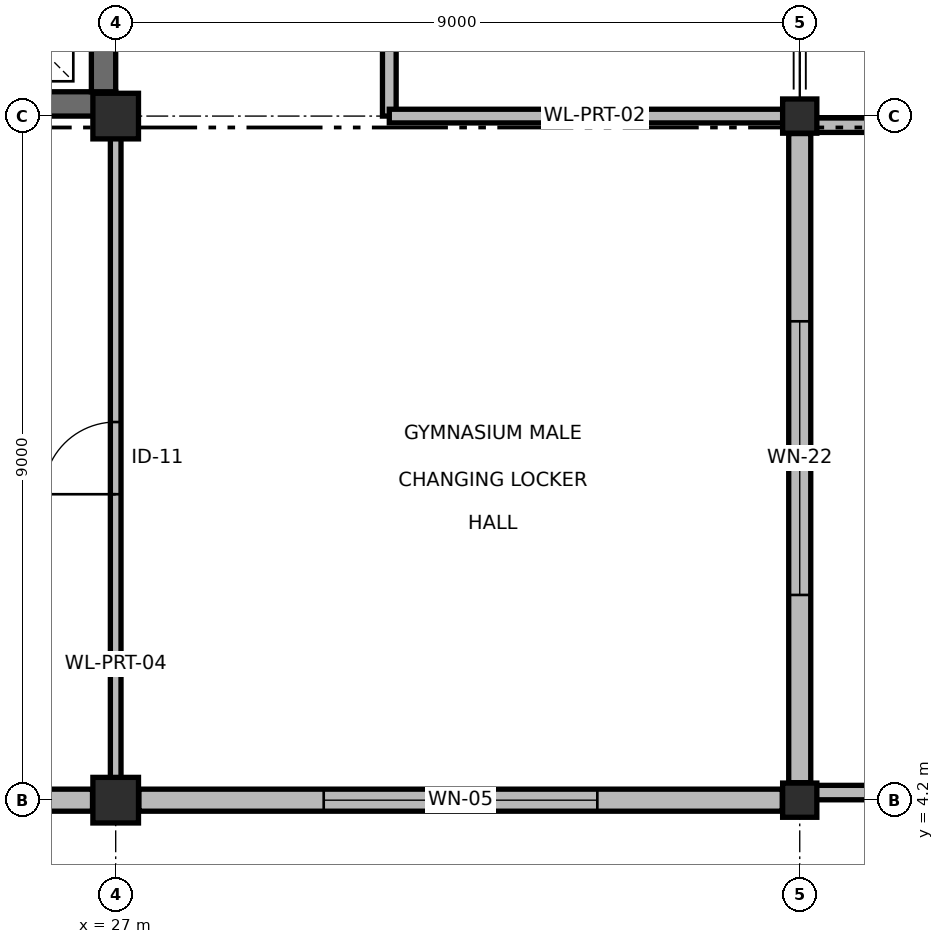
"""IFC4 building model, lengths in metres.
Left out: names, types, materials, properties, quantities, classifications, styles, units other than length and angle.
Written with IfcOpenShell. Run it as: python <this file> out.ifc"""

import sys

from ifc_helpers import new_model, si_unit, direction, frame, frame_2d, origin, origin_2d, place, context, subcontext, project, spatial, rectangle, extrude, element, fill, save


model = new_model("IFC4")
c1 = context("Model", 3, precision=1e-05, world=origin(), true_north=direction((0.0, 1.0)))
c2 = subcontext(c1, "Body", "Model", "MODEL_VIEW")
j1 = project(units=[si_unit("LENGTHUNIT", "METRE"), si_unit("PLANEANGLEUNIT", "RADIAN")], contexts=[c1])
p1 = place(None, origin())
s1 = spatial("IfcSite", under=j1, at=p1, CompositionType="ELEMENT")
p2 = place(p1, origin())
s2 = spatial("IfcBuilding", under=s1, at=p2, CompositionType="ELEMENT")
p3 = place(p2, frame((0.0, 0.0, 9.6)))
s3 = spatial("IfcBuildingStorey", under=s2, at=p3, CompositionType="ELEMENT", Elevation=9.6)
for number, where, z_axis, x_axis in (
    (1, (27.0, 4.2, 0.0), (0.0, 0.0, 1.0), (1.0, 0.0, 0.0)),
    (2, (27.0, 13.2, 0.0), (0.0, 0.0, 1.0), (1.0, 0.0, 0.0)),
):
    element("IfcColumn", number, at=place(p3, frame(where, z_axis=z_axis, x_axis=x_axis)), inside=s3, PredefinedType="COLUMN", context=c2, shape_type="SweptSolid", body=[
        extrude(rectangle(XDim=0.6, YDim=0.6, at=origin_2d()), origin(), (0.0, 0.0, 1.0), 4.5),
    ])
for number, where, z_axis, x_axis in (
    (3, (36.0, 4.2, 0.0), (0.0, 0.0, 1.0), (1.0, 0.0, 0.0)),
    (4, (36.0, 13.2, 0.0), (0.0, 0.0, 1.0), (1.0, 0.0, 0.0)),
):
    element("IfcColumn", number, at=place(p3, frame(where, z_axis=z_axis, x_axis=x_axis)), inside=s3, PredefinedType="COLUMN", context=c2, shape_type="SweptSolid", body=[
        extrude(rectangle(XDim=0.45, YDim=0.45, at=origin_2d()), origin(), (0.0, 0.0, 1.0), 4.5),
    ])
p4 = place(p3, frame((9.0, 13.36, 0.0), z_axis=(0.0, 0.0, 1.0), x_axis=(1.0, 0.0, 0.0)))
e5 = element("IfcWall", 5, at=p4, inside=s3, PredefinedType="SHEAR", context=c2, shape_type="SweptSolid", body=[
    extrude(rectangle(XDim=18.0, YDim=0.32, at=frame_2d((9.0, 0.0))), origin(), (0.0, 0.0, 1.0), 4.5),
])
p5 = place(p3, frame((26.84, 13.52, 0.0), z_axis=(0.0, 0.0, 1.0), x_axis=(0.0, 1.0, 0.0)))
e6 = element("IfcWall", 6, at=p5, inside=s3, PredefinedType="SHEAR", context=c2, shape_type="SweptSolid", body=[
    extrude(rectangle(XDim=8.48, YDim=0.32, at=frame_2d((4.24, 0.0))), origin(), (0.0, 0.0, 1.0), 4.5),
])
p6 = place(p3, frame((26.695, 4.2, 0.0), z_axis=(0.0, 0.0, 1.0), x_axis=(-1.0, 0.0, 0.0)))
e7 = element("IfcWall", 7, at=p6, inside=s3, PredefinedType="SOLIDWALL", context=c2, shape_type="SweptSolid", body=[
    extrude(rectangle(XDim=8.39, YDim=0.29, at=frame_2d((4.195, 0.0))), origin(), (0.0, 0.0, 1.0), 3.525),
])
p7 = place(p6, frame((3.295, 0.0, 0.95)))
e8 = element("IfcOpeningElement", 8, at=p7, cuts=e7, PredefinedType="OPENING", context=c2, shape_type="SweptSolid", body=[
    extrude(rectangle(XDim=1.8, YDim=0.9, at=frame_2d((0.9, 0.45))), frame((0.0, 0.155, 0.0), z_axis=(0.0, -1.0, 0.0), x_axis=(1.0, 0.0, 0.0)), (0.0, 0.0, 1.0), 0.31),
])
p8 = place(p3, frame((35.77, 4.2, 0.0), z_axis=(0.0, 0.0, 1.0), x_axis=(-1.0, 0.0, 0.0)))
e9 = element("IfcWall", 9, at=p8, inside=s3, PredefinedType="SOLIDWALL", context=c2, shape_type="SweptSolid", body=[
    extrude(rectangle(XDim=8.465, YDim=0.29, at=frame_2d((4.232, 0.0))), origin(), (0.0, 0.0, 1.0), 3.525),
])
p9 = place(p8, frame((2.433, 0.0, 0.95)))
e10 = element("IfcOpeningElement", 10, at=p9, cuts=e9, PredefinedType="OPENING", context=c2, shape_type="SweptSolid", body=[
    extrude(rectangle(XDim=3.6, YDim=1.2, at=frame_2d((1.8, 0.6))), frame((0.0, 0.155, 0.0), z_axis=(0.0, -1.0, 0.0), x_axis=(1.0, 0.0, 0.0)), (0.0, 0.0, 1.0), 0.31),
])
p10 = place(p3, frame((36.0, 12.97, 0.0), z_axis=(0.0, 0.0, 1.0), x_axis=(0.0, -1.0, 0.0)))
e11 = element("IfcWall", 11, at=p10, inside=s3, PredefinedType="SOLIDWALL", context=c2, shape_type="SweptSolid", body=[
    extrude(rectangle(XDim=8.54, YDim=0.29, at=frame_2d((4.27, 0.0))), origin(), (0.0, 0.0, 1.0), 3.525),
])
p11 = place(p10, frame((2.47, 0.0, 0.85)))
e12 = element("IfcOpeningElement", 12, at=p11, cuts=e11, PredefinedType="OPENING", context=c2, shape_type="SweptSolid", body=[
    extrude(rectangle(XDim=3.6, YDim=2.0, at=frame_2d((1.8, 1.0))), frame((0.0, 0.155, 0.0), z_axis=(0.0, -1.0, 0.0), x_axis=(1.0, 0.0, 0.0)), (0.0, 0.0, 1.0), 0.31),
])
for number, where, z_axis, x_axis in (
    (13, (36.15, 13.08, 0.0), (0.0, 0.0, 1.0), (1.0, 0.0, 0.0)),
    (14, (36.15, 4.3, 0.0), (0.0, 0.0, 1.0), (1.0, 0.0, 0.0)),
):
    element("IfcWall", number, at=place(p3, frame(where, z_axis=z_axis, x_axis=x_axis)), inside=s3, PredefinedType="PARAPET", context=c2, shape_type="SweptSolid", body=[
        extrude(rectangle(XDim=8.75, YDim=0.19, at=frame_2d((4.375, 0.0))), origin(), (0.0, 0.0, 1.0), 1.12),
    ])
p12 = place(p3, frame((30.6, 13.2, 0.0), z_axis=(0.0, 0.0, 1.0), x_axis=(0.0, 1.0, 0.0)))
e15 = element("IfcWall", 15, at=p12, inside=s3, PredefinedType="PARTITIONING", context=c2, shape_type="SweptSolid", body=[
    extrude(rectangle(XDim=26.4, YDim=0.18, at=frame_2d((13.2, 0.0))), origin(), (0.0, 0.0, 1.0), 3.575),
])
p13 = place(p12, frame((19.767, 0.0, 0.0)))
e16 = element("IfcOpeningElement", 16, at=p13, cuts=e15, PredefinedType="OPENING", context=c2, shape_type="SweptSolid", body=[
    extrude(rectangle(XDim=1.65, YDim=2.2, at=frame_2d((0.825, 1.1))), frame((0.0, 0.1, 0.0), z_axis=(0.0, -1.0, 0.0), x_axis=(1.0, 0.0, 0.0)), (0.0, 0.0, 1.0), 0.2),
])
p14 = place(p3, frame((30.6, 13.2, 0.0), z_axis=(0.0, 0.0, 1.0), x_axis=(1.0, 0.0, 0.0)))
e17 = element("IfcWall", 17, at=p14, inside=s3, PredefinedType="PARTITIONING", context=c2, shape_type="SweptSolid", body=[
    extrude(rectangle(XDim=5.4, YDim=0.18, at=frame_2d((2.7, 0.0))), origin(), (0.0, 0.0, 1.0), 3.525),
])
p15 = place(p3, frame((27.0, 4.2, 0.0), z_axis=(0.0, 0.0, 1.0), x_axis=(0.0, 1.0, 0.0)))
e18 = element("IfcWall", 18, at=p15, inside=s3, PredefinedType="PARTITIONING", context=c2, shape_type="SweptSolid", body=[
    extrude(rectangle(XDim=9.0, YDim=0.14, at=frame_2d((4.5, 0.0))), origin(), (0.0, 0.0, 1.0), 3.525),
])
p16 = place(p15, frame((4.025, 0.0, 0.0)))
e19 = element("IfcOpeningElement", 19, at=p16, cuts=e18, PredefinedType="OPENING", context=c2, shape_type="SweptSolid", body=[
    extrude(rectangle(XDim=0.95, YDim=2.1, at=frame_2d((0.475, 1.05))), frame((0.0, 0.08, 0.0), z_axis=(0.0, -1.0, 0.0), x_axis=(1.0, 0.0, 0.0)), (0.0, 0.0, 1.0), 0.16),
])
p17 = place(p9, origin())
e20 = element("IfcWindow", 20, at=p17, inside=s3, PartitioningType="SINGLE_PANEL", PredefinedType="WINDOW", context=c2, shape_type="SweptSolid", body=[
    extrude(rectangle(XDim=3.6, YDim=1.2, at=frame_2d((1.8, 0.6))), frame((0.0, 0.03, 0.0), z_axis=(0.0, -1.0, 0.0), x_axis=(1.0, 0.0, 0.0)), (0.0, 0.0, 1.0), 0.06),
])
fill(e10, e20)
p18 = place(p11, origin())
e21 = element("IfcWindow", 21, at=p18, inside=s3, PartitioningType="SINGLE_PANEL", PredefinedType="WINDOW", context=c2, shape_type="SweptSolid", body=[
    extrude(rectangle(XDim=3.6, YDim=2.0, at=frame_2d((1.8, 1.0))), frame((0.0, 0.03, 0.0), z_axis=(0.0, -1.0, 0.0), x_axis=(1.0, 0.0, 0.0)), (0.0, 0.0, 1.0), 0.06),
])
fill(e12, e21)
p19 = place(p16, origin())
e22 = element("IfcDoor", 22, at=p19, inside=s3, OperationType="SINGLE_SWING_LEFT", PredefinedType="DOOR", context=c2, shape_type="SweptSolid", body=[
    extrude(rectangle(XDim=0.95, YDim=2.1, at=frame_2d((0.475, 1.05))), frame((0.0, 0.025, 0.0), z_axis=(0.0, -1.0, 0.0), x_axis=(1.0, 0.0, 0.0)), (0.0, 0.0, 1.0), 0.05),
])
fill(e19, e22)
save(model, sys.argv[1])
